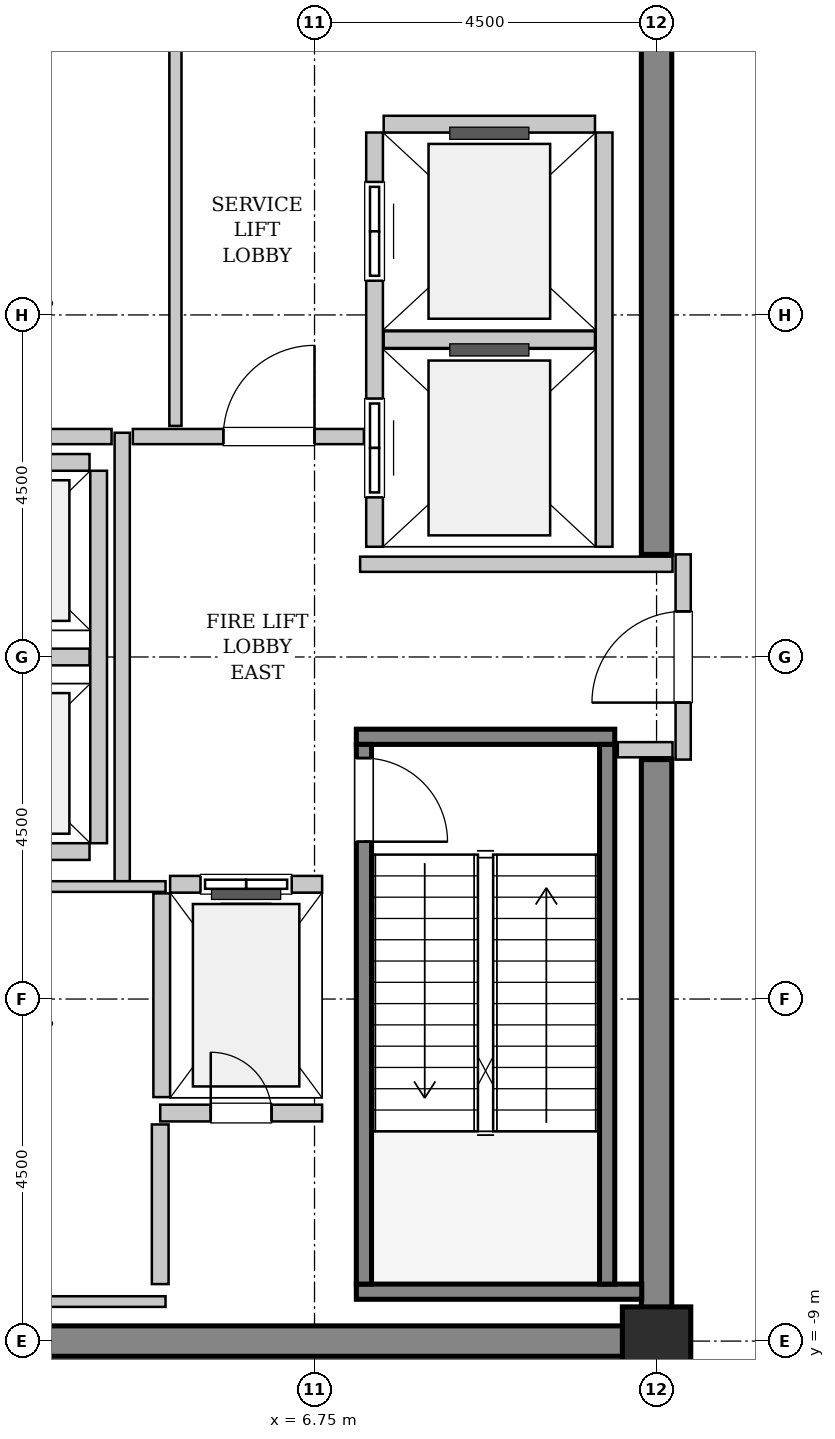
"""IFC4 building model, lengths in metres.
Left out: names, types, materials, properties, quantities, classifications, styles, units other than length and angle.
Written with IfcOpenShell. Run it as: python <this file> out.ifc"""

import sys

from ifc_helpers import new_model, si_unit, direction, frame, frame_2d, origin, origin_2d, place, context, subcontext, project, spatial, rectangle, extrude, source, transform, mapped, element, fill, save


model = new_model("IFC4")
c1 = context("Model", 3, precision=1e-05, world=origin(), true_north=direction((0.0, 1.0)))
c2 = subcontext(c1, "Body", "Model", "MODEL_VIEW")
j1 = project(units=[si_unit("LENGTHUNIT", "METRE"), si_unit("PLANEANGLEUNIT", "RADIAN")], contexts=[c1])
p1 = place(None, origin())
s1 = spatial("IfcSite", under=j1, at=p1, CompositionType="ELEMENT")
p2 = place(p1, origin())
s2 = spatial("IfcBuilding", under=s1, at=p2, CompositionType="ELEMENT")
p3 = place(p2, frame((0.0, 0.0, 353.8)))
s3 = spatial("IfcBuildingStorey", under=s2, at=p3, CompositionType="ELEMENT", Elevation=353.8)
m1 = source(origin(), c2, "Body", "SweptSolid", [
    extrude(rectangle(XDim=9.9, YDim=0.4, at=frame_2d((4.95, 0.0))), origin(), (0.0, 0.0, 1.0), 4.8),
])
p4 = place(p3, frame((1.55, -9.0, 0.0), z_axis=(0.0, 0.0, 1.0), x_axis=(1.0, 0.0, 0.0)))
e1 = element("IfcWall", 1, at=p4, inside=s3, PredefinedType="SHEAR", context=c2, shape_type="MappedRepresentation", body=[
    mapped(m1, transform((0.0, 0.0, 0.0), x_axis=(1.0, 0.0, 0.0), y_axis=(0.0, 1.0, 0.0), z_axis=(0.0, 0.0, 1.0), scale=1.0)),
])
m2 = source(origin(), c2, "Body", "SweptSolid", [
    extrude(rectangle(XDim=7.45, YDim=0.4, at=frame_2d((3.725, 0.0))), origin(), (0.0, 0.0, 1.0), 4.8),
])
for number, where, z_axis, x_axis in (
    (2, (11.25, -8.8, 0.0), (0.0, 0.0, 1.0), (0.0, 1.0, 0.0)),
    (3, (11.25, 1.35, 0.0), (0.0, 0.0, 1.0), (0.0, 1.0, 0.0)),
):
    element("IfcWall", number, at=place(p3, frame(where, z_axis=z_axis, x_axis=x_axis)), inside=s3, PredefinedType="SHEAR", context=c2, shape_type="MappedRepresentation", body=[
        mapped(m2, transform((0.0, 0.0, 0.0), x_axis=(1.0, 0.0, 0.0), y_axis=(0.0, 1.0, 0.0), z_axis=(0.0, 0.0, 1.0), scale=1.0)),
    ])
m3 = source(origin(), c2, "Body", "SweptSolid", [
    extrude(rectangle(XDim=0.9, YDim=0.9, at=origin_2d()), origin(), (0.0, 0.0, 1.0), 4.8),
])
p5 = place(p3, frame((11.25, -9.0, 0.0), z_axis=(0.0, 0.0, 1.0), x_axis=(1.0, 0.0, 0.0)))
e4 = element("IfcColumn", 4, at=p5, inside=s3, PredefinedType="COLUMN", context=c2, shape_type="MappedRepresentation", body=[
    mapped(m3, transform((0.0, 0.0, 0.0), x_axis=(1.0, 0.0, 0.0), y_axis=(0.0, 1.0, 0.0), z_axis=(0.0, 0.0, 1.0), scale=1.0)),
])
m4 = source(origin(), c2, "Body", "SweptSolid", [
    extrude(rectangle(XDim=3.4, YDim=0.2, at=frame_2d((1.7, 0.0))), origin(), (0.0, 0.0, 1.0), 4.8),
])
p6 = place(p3, frame((7.3, -1.05, 0.0), z_axis=(0.0, 0.0, 1.0), x_axis=(1.0, 0.0, 0.0)))
e5 = element("IfcWall", 5, at=p6, inside=s3, PredefinedType="SOLIDWALL", context=c2, shape_type="MappedRepresentation", body=[
    mapped(m4, transform((0.0, 0.0, 0.0), x_axis=(1.0, 0.0, 0.0), y_axis=(0.0, 1.0, 0.0), z_axis=(0.0, 0.0, 1.0), scale=1.0)),
])
m5 = source(origin(), c2, "Body", "SweptSolid", [
    extrude(rectangle(XDim=3.755, YDim=0.2, at=frame_2d((1.877, 0.0))), origin(), (0.0, 0.0, 1.0), 4.8),
])
p7 = place(p3, frame((7.3, -8.35, 0.0), z_axis=(0.0, 0.0, 1.0), x_axis=(1.0, 0.0, 0.0)))
e6 = element("IfcWall", 6, at=p7, inside=s3, PredefinedType="SOLIDWALL", context=c2, shape_type="MappedRepresentation", body=[
    mapped(m5, transform((0.0, 0.0, 0.0), x_axis=(1.0, 0.0, 0.0), y_axis=(0.0, 1.0, 0.0), z_axis=(0.0, 0.0, 1.0), scale=1.0)),
])
m6 = source(origin(), c2, "Body", "SweptSolid", [
    extrude(rectangle(XDim=7.1, YDim=0.2, at=frame_2d((3.55, 0.0))), origin(), (0.0, 0.0, 1.0), 4.8),
])
p8 = place(p3, frame((7.4, -1.15, 0.0), z_axis=(0.0, 0.0, 1.0), x_axis=(0.0, -1.0, 0.0)))
e7 = element("IfcWall", 7, at=p8, inside=s3, PredefinedType="SOLIDWALL", context=c2, shape_type="MappedRepresentation", body=[
    mapped(m6, transform((0.0, 0.0, 0.0), x_axis=(1.0, 0.0, 0.0), y_axis=(0.0, 1.0, 0.0), z_axis=(0.0, 0.0, 1.0), scale=1.0)),
])
p9 = place(p8, frame((0.18, 0.0, 0.0)))
e8 = element("IfcOpeningElement", 8, at=p9, cuts=e7, PredefinedType="OPENING", context=c2, shape_type="SweptSolid", body=[
    extrude(rectangle(XDim=1.1, YDim=2.15, at=frame_2d((0.55, 1.075))), frame((0.0, 0.11, 0.0), z_axis=(0.0, -1.0, 0.0), x_axis=(1.0, 0.0, 0.0)), (0.0, 0.0, 1.0), 0.22),
])
p10 = place(p3, frame((10.6, -1.15, 0.0), z_axis=(0.0, 0.0, 1.0), x_axis=(0.0, -1.0, 0.0)))
e9 = element("IfcWall", 9, at=p10, inside=s3, PredefinedType="SOLIDWALL", context=c2, shape_type="MappedRepresentation", body=[
    mapped(m6, transform((0.0, 0.0, 0.0), x_axis=(1.0, 0.0, 0.0), y_axis=(0.0, 1.0, 0.0), z_axis=(0.0, 0.0, 1.0), scale=1.0)),
])
m7 = source(origin(), c2, "Body", "SweptSolid", [
    extrude(rectangle(XDim=2.0, YDim=0.22, at=frame_2d((1.0, 0.0))), origin(), (0.0, 0.0, 1.0), 4.485),
])
p11 = place(p3, frame((6.85, -2.99, 0.0), z_axis=(0.0, 0.0, 1.0), x_axis=(-1.0, 0.0, 0.0)))
e10 = element("IfcWall", 10, at=p11, inside=s3, PredefinedType="SOLIDWALL", context=c2, shape_type="MappedRepresentation", body=[
    mapped(m7, transform((0.0, 0.0, 0.0), x_axis=(1.0, 0.0, 0.0), y_axis=(0.0, 1.0, 0.0), z_axis=(0.0, 0.0, 1.0), scale=1.0)),
])
p12 = place(p11, frame((0.4, 0.0, 0.0)))
e11 = element("IfcOpeningElement", 11, at=p12, cuts=e10, PredefinedType="OPENING", context=c2, shape_type="SweptSolid", body=[
    extrude(rectangle(XDim=1.2, YDim=2.2, at=frame_2d((0.6, 1.1))), frame((0.0, 0.12, 0.0), z_axis=(0.0, -1.0, 0.0), x_axis=(1.0, 0.0, 0.0)), (0.0, 0.0, 1.0), 0.24),
])
m8 = source(origin(), c2, "Body", "SweptSolid", [
    extrude(rectangle(XDim=2.68, YDim=0.22, at=frame_2d((1.34, 0.0))), origin(), (0.0, 0.0, 1.0), 4.485),
])
p13 = place(p3, frame((4.74, -3.11, 0.0), z_axis=(0.0, 0.0, 1.0), x_axis=(0.0, -1.0, 0.0)))
e12 = element("IfcWall", 12, at=p13, inside=s3, PredefinedType="SOLIDWALL", context=c2, shape_type="MappedRepresentation", body=[
    mapped(m8, transform((0.0, 0.0, 0.0), x_axis=(1.0, 0.0, 0.0), y_axis=(0.0, 1.0, 0.0), z_axis=(0.0, 0.0, 1.0), scale=1.0)),
])
m9 = source(origin(), c2, "Body", "SweptSolid", [
    extrude(rectangle(XDim=5.45, YDim=0.22, at=frame_2d((2.725, 0.0))), origin(), (0.0, 0.0, 1.0), 4.485),
])
p14 = place(p3, frame((7.54, 6.9, 0.0), z_axis=(0.0, 0.0, 1.0), x_axis=(0.0, -1.0, 0.0)))
e13 = element("IfcWall", 13, at=p14, inside=s3, PredefinedType="SOLIDWALL", context=c2, shape_type="MappedRepresentation", body=[
    mapped(m9, transform((0.0, 0.0, 0.0), x_axis=(1.0, 0.0, 0.0), y_axis=(0.0, 1.0, 0.0), z_axis=(0.0, 0.0, 1.0), scale=1.0)),
])
p15 = place(p14, frame((3.5, 0.0, 0.0)))
e14 = element("IfcOpeningElement", 14, at=p15, cuts=e13, PredefinedType="OPENING", context=c2, shape_type="SweptSolid", body=[
    extrude(rectangle(XDim=1.3, YDim=2.3, at=frame_2d((0.65, 1.15))), frame((0.0, 0.12, 0.0), z_axis=(0.0, -1.0, 0.0), x_axis=(1.0, 0.0, 0.0)), (0.0, 0.0, 1.0), 0.24),
])
p16 = place(p14, frame((0.65, 0.0, 0.0)))
e15 = element("IfcOpeningElement", 15, at=p16, cuts=e13, PredefinedType="OPENING", context=c2, shape_type="SweptSolid", body=[
    extrude(rectangle(XDim=1.3, YDim=2.3, at=frame_2d((0.65, 1.15))), frame((0.0, 0.12, 0.0), z_axis=(0.0, -1.0, 0.0), x_axis=(1.0, 0.0, 0.0)), (0.0, 0.0, 1.0), 0.24),
])
p17 = place(p3, frame((10.56, 1.45, 0.0), z_axis=(0.0, 0.0, 1.0), x_axis=(0.0, 1.0, 0.0)))
e16 = element("IfcWall", 16, at=p17, inside=s3, PredefinedType="SOLIDWALL", context=c2, shape_type="MappedRepresentation", body=[
    mapped(m9, transform((0.0, 0.0, 0.0), x_axis=(1.0, 0.0, 0.0), y_axis=(0.0, 1.0, 0.0), z_axis=(0.0, 0.0, 1.0), scale=1.0)),
])
m10 = source(origin(), c2, "Body", "SweptSolid", [
    extrude(rectangle(XDim=2.78, YDim=0.22, at=frame_2d((1.39, 0.0))), origin(), (0.0, 0.0, 1.0), 4.485),
])
for number, where, z_axis, x_axis in (
    (17, (7.66, 4.175, 0.0), (0.0, 0.0, 1.0), (1.0, 0.0, 0.0)),
    (18, (10.44, 7.01, 0.0), (0.0, 0.0, 1.0), (-1.0, 0.0, 0.0)),
):
    element("IfcWall", number, at=place(p3, frame(where, z_axis=z_axis, x_axis=x_axis)), inside=s3, PredefinedType="SOLIDWALL", context=c2, shape_type="MappedRepresentation", body=[
        mapped(m10, transform((0.0, 0.0, 0.0), x_axis=(1.0, 0.0, 0.0), y_axis=(0.0, 1.0, 0.0), z_axis=(0.0, 0.0, 1.0), scale=1.0)),
    ])
m11 = source(origin(), c2, "Body", "SweptSolid", [
    extrude(rectangle(XDim=4.9, YDim=0.22, at=frame_2d((2.45, 0.0))), origin(), (0.0, 0.0, 1.0), 4.485),
])
p18 = place(p3, frame((3.91, -2.45, 0.0), z_axis=(0.0, 0.0, 1.0), x_axis=(0.0, 1.0, 0.0)))
e19 = element("IfcWall", 19, at=p18, inside=s3, PredefinedType="SOLIDWALL", context=c2, shape_type="MappedRepresentation", body=[
    mapped(m11, transform((0.0, 0.0, 0.0), x_axis=(1.0, 0.0, 0.0), y_axis=(0.0, 1.0, 0.0), z_axis=(0.0, 0.0, 1.0), scale=1.0)),
])
m12 = source(origin(), c2, "Body", "SweptSolid", [
    extrude(rectangle(XDim=2.13, YDim=0.22, at=frame_2d((1.065, 0.0))), origin(), (0.0, 0.0, 1.0), 4.485),
])
for number, where, z_axis, x_axis in (
    (20, (1.66, -2.56, 0.0), (0.0, 0.0, 1.0), (1.0, 0.0, 0.0)),
    (21, (1.66, 0.0, 0.0), (0.0, 0.0, 1.0), (1.0, 0.0, 0.0)),
    (22, (3.79, 2.56, 0.0), (0.0, 0.0, 1.0), (-1.0, 0.0, 0.0)),
):
    element("IfcWall", number, at=place(p3, frame(where, z_axis=z_axis, x_axis=x_axis)), inside=s3, PredefinedType="SOLIDWALL", context=c2, shape_type="MappedRepresentation", body=[
        mapped(m12, transform((0.0, 0.0, 0.0), x_axis=(1.0, 0.0, 0.0), y_axis=(0.0, 1.0, 0.0), z_axis=(0.0, 0.0, 1.0), scale=1.0)),
    ])
p19 = place(p3, frame((4.72, -6.0, 0.0), z_axis=(0.0, 0.0, 1.0), x_axis=(1.0, 0.0, 0.0)))
e23 = element("IfcWall", 23, at=p19, inside=s3, PredefinedType="SOLIDWALL", context=c2, shape_type="MappedRepresentation", body=[
    mapped(m12, transform((0.0, 0.0, 0.0), x_axis=(1.0, 0.0, 0.0), y_axis=(0.0, 1.0, 0.0), z_axis=(0.0, 0.0, 1.0), scale=1.0)),
])
p20 = place(p19, frame((0.665, 0.0, 0.0)))
e24 = element("IfcOpeningElement", 24, at=p20, cuts=e23, PredefinedType="OPENING", context=c2, shape_type="SweptSolid", body=[
    extrude(rectangle(XDim=0.8, YDim=2.0, at=frame_2d((0.4, 1.0))), frame((0.0, 0.12, 0.0), z_axis=(0.0, -1.0, 0.0), x_axis=(1.0, 0.0, 0.0)), (0.0, 0.0, 1.0), 0.24),
])
m13 = source(origin(), c2, "Body", "SweptSolid", [
    extrude(rectangle(XDim=2.1, YDim=0.22, at=frame_2d((1.05, 0.0))), origin(), (0.0, 0.0, 1.0), 4.485),
])
p21 = place(p3, frame((4.72, -8.25, 0.0), z_axis=(0.0, 0.0, 1.0), x_axis=(0.0, 1.0, 0.0)))
e25 = element("IfcWall", 25, at=p21, inside=s3, PredefinedType="SOLIDWALL", context=c2, shape_type="MappedRepresentation", body=[
    mapped(m13, transform((0.0, 0.0, 0.0), x_axis=(1.0, 0.0, 0.0), y_axis=(0.0, 1.0, 0.0), z_axis=(0.0, 0.0, 1.0), scale=1.0)),
])
m14 = source(origin(), c2, "Body", "SweptSolid", [
    extrude(rectangle(XDim=2.7, YDim=0.2, at=frame_2d((1.35, 0.0))), origin(), (0.0, 0.0, 1.0), 3.575),
])
p22 = place(p3, frame((11.6, -1.35, 0.0), z_axis=(0.0, 0.0, 1.0), x_axis=(0.0, 1.0, 0.0)))
e26 = element("IfcWall", 26, at=p22, inside=s3, PredefinedType="PARTITIONING", context=c2, shape_type="MappedRepresentation", body=[
    mapped(m14, transform((0.0, 0.0, 0.0), x_axis=(1.0, 0.0, 0.0), y_axis=(0.0, 1.0, 0.0), z_axis=(0.0, 0.0, 1.0), scale=1.0)),
])
p23 = place(p22, frame((0.75, 0.0, 0.0)))
e27 = element("IfcOpeningElement", 27, at=p23, cuts=e26, PredefinedType="OPENING", context=c2, shape_type="SweptSolid", body=[
    extrude(rectangle(XDim=1.2, YDim=2.15, at=frame_2d((0.6, 1.075))), frame((0.0, 0.11, 0.0), z_axis=(0.0, -1.0, 0.0), x_axis=(1.0, 0.0, 0.0)), (0.0, 0.0, 1.0), 0.22),
])
m15 = source(origin(), c2, "Body", "SweptSolid", [
    extrude(rectangle(XDim=5.9, YDim=0.2, at=frame_2d((2.95, 0.0))), origin(), (0.0, 0.0, 1.0), 4.485),
])
p24 = place(p3, frame((4.22, -2.95, 0.0), z_axis=(0.0, 0.0, 1.0), x_axis=(0.0, 1.0, 0.0)))
e28 = element("IfcWall", 28, at=p24, inside=s3, PredefinedType="PARTITIONING", context=c2, shape_type="MappedRepresentation", body=[
    mapped(m15, transform((0.0, 0.0, 0.0), x_axis=(1.0, 0.0, 0.0), y_axis=(0.0, 1.0, 0.0), z_axis=(0.0, 0.0, 1.0), scale=1.0)),
])
m16 = source(origin(), c2, "Body", "SweptSolid", [
    extrude(rectangle(XDim=2.52, YDim=0.2, at=frame_2d((1.26, 0.0))), origin(), (0.0, 0.0, 1.0), 4.485),
])
p25 = place(p3, frame((1.56, 2.9, 0.0), z_axis=(0.0, 0.0, 1.0), x_axis=(1.0, 0.0, 0.0)))
e29 = element("IfcWall", 29, at=p25, inside=s3, PredefinedType="PARTITIONING", context=c2, shape_type="MappedRepresentation", body=[
    mapped(m16, transform((0.0, 0.0, 0.0), x_axis=(1.0, 0.0, 0.0), y_axis=(0.0, 1.0, 0.0), z_axis=(0.0, 0.0, 1.0), scale=1.0)),
])
m17 = source(origin(), c2, "Body", "SweptSolid", [
    extrude(rectangle(XDim=3.04, YDim=0.2, at=frame_2d((1.52, 0.0))), origin(), (0.0, 0.0, 1.0), 4.485),
])
p26 = place(p3, frame((4.36, 2.9, 0.0), z_axis=(0.0, 0.0, 1.0), x_axis=(1.0, 0.0, 0.0)))
e30 = element("IfcWall", 30, at=p26, inside=s3, PredefinedType="PARTITIONING", context=c2, shape_type="MappedRepresentation", body=[
    mapped(m17, transform((0.0, 0.0, 0.0), x_axis=(1.0, 0.0, 0.0), y_axis=(0.0, 1.0, 0.0), z_axis=(0.0, 0.0, 1.0), scale=1.0)),
])
p27 = place(p26, frame((1.19, 0.0, 0.0)))
e31 = element("IfcOpeningElement", 31, at=p27, cuts=e30, PredefinedType="OPENING", context=c2, shape_type="SweptSolid", body=[
    extrude(rectangle(XDim=1.2, YDim=2.15, at=frame_2d((0.6, 1.075))), frame((0.0, 0.11, 0.0), z_axis=(0.0, -1.0, 0.0), x_axis=(1.0, 0.0, 0.0)), (0.0, 0.0, 1.0), 0.22),
])
m18 = source(origin(), c2, "Body", "SweptSolid", [
    extrude(rectangle(XDim=4.11, YDim=0.2, at=frame_2d((2.055, 0.0))), origin(), (0.0, 0.0, 1.0), 4.485),
])
p28 = place(p3, frame((7.35, 1.22, 0.0), z_axis=(0.0, 0.0, 1.0), x_axis=(1.0, 0.0, 0.0)))
e32 = element("IfcWall", 32, at=p28, inside=s3, PredefinedType="PARTITIONING", context=c2, shape_type="MappedRepresentation", body=[
    mapped(m18, transform((0.0, 0.0, 0.0), x_axis=(1.0, 0.0, 0.0), y_axis=(0.0, 1.0, 0.0), z_axis=(0.0, 0.0, 1.0), scale=1.0)),
])
m19 = source(origin(), c2, "Body", "SweptSolid", [
    extrude(rectangle(XDim=0.72, YDim=0.2, at=frame_2d((0.36, 0.0))), origin(), (0.0, 0.0, 1.0), 4.485),
])
p29 = place(p3, frame((10.74, -1.22, 0.0), z_axis=(0.0, 0.0, 1.0), x_axis=(1.0, 0.0, 0.0)))
e33 = element("IfcWall", 33, at=p29, inside=s3, PredefinedType="PARTITIONING", context=c2, shape_type="MappedRepresentation", body=[
    mapped(m19, transform((0.0, 0.0, 0.0), x_axis=(1.0, 0.0, 0.0), y_axis=(0.0, 1.0, 0.0), z_axis=(0.0, 0.0, 1.0), scale=1.0)),
])
m20 = source(origin(), c2, "Body", "SweptSolid", [
    extrude(rectangle(XDim=5.45, YDim=0.16, at=frame_2d((2.725, 0.0))), origin(), (0.0, 0.0, 1.0), 4.485),
])
p30 = place(p3, frame((4.92, 3.04, 0.0), z_axis=(0.0, 0.0, 1.0), x_axis=(0.0, 1.0, 0.0)))
e34 = element("IfcWall", 34, at=p30, inside=s3, PredefinedType="PARTITIONING", context=c2, shape_type="MappedRepresentation", body=[
    mapped(m20, transform((0.0, 0.0, 0.0), x_axis=(1.0, 0.0, 0.0), y_axis=(0.0, 1.0, 0.0), z_axis=(0.0, 0.0, 1.0), scale=1.0)),
])
m21 = source(origin(), c2, "Body", "SweptSolid", [
    extrude(rectangle(XDim=3.15, YDim=0.14, at=frame_2d((1.575, 0.0))), origin(), (0.0, 0.0, 1.0), 4.485),
])
for number, where, z_axis, x_axis in (
    (35, (1.64, -3.02, 0.0), (0.0, 0.0, 1.0), (1.0, 0.0, 0.0)),
    (36, (1.64, -8.48, 0.0), (0.0, 0.0, 1.0), (1.0, 0.0, 0.0)),
):
    element("IfcWall", number, at=place(p3, frame(where, z_axis=z_axis, x_axis=x_axis)), inside=s3, PredefinedType="PARTITIONING", context=c2, shape_type="MappedRepresentation", body=[
        mapped(m21, transform((0.0, 0.0, 0.0), x_axis=(1.0, 0.0, 0.0), y_axis=(0.0, 1.0, 0.0), z_axis=(0.0, 0.0, 1.0), scale=1.0)),
    ])
m22 = source(origin(), c2, "Body", "SweptSolid", [
    extrude(rectangle(XDim=1.1, YDim=2.15, at=frame_2d((0.55, 1.075))), frame((0.0, 0.025, 0.0), z_axis=(0.0, -1.0, 0.0), x_axis=(1.0, 0.0, 0.0)), (0.0, 0.0, 1.0), 0.05),
])
p31 = place(p9, origin())
e37 = element("IfcDoor", 37, at=p31, inside=s3, OperationType="SINGLE_SWING_RIGHT", PredefinedType="DOOR", context=c2, shape_type="MappedRepresentation", body=[
    mapped(m22, transform((0.0, 0.0, 0.0), x_axis=(1.0, 0.0, 0.0), y_axis=(0.0, 1.0, 0.0), z_axis=(0.0, 0.0, 1.0), scale=1.0)),
])
fill(e8, e37)
m23 = source(origin(), c2, "Body", "SweptSolid", [
    extrude(rectangle(XDim=1.2, YDim=2.2, at=frame_2d((0.6, 1.1))), frame((0.0, 0.025, 0.0), z_axis=(0.0, -1.0, 0.0), x_axis=(1.0, 0.0, 0.0)), (0.0, 0.0, 1.0), 0.05),
])
p32 = place(p12, origin())
e38 = element("IfcDoor", 38, at=p32, inside=s3, OperationType="SLIDING_TO_LEFT", PredefinedType="DOOR", context=c2, shape_type="MappedRepresentation", body=[
    mapped(m23, transform((0.0, 0.0, 0.0), x_axis=(1.0, 0.0, 0.0), y_axis=(0.0, 1.0, 0.0), z_axis=(0.0, 0.0, 1.0), scale=1.0)),
])
fill(e11, e38)
m24 = source(origin(), c2, "Body", "SweptSolid", [
    extrude(rectangle(XDim=1.3, YDim=2.3, at=frame_2d((0.65, 1.15))), frame((0.0, 0.025, 0.0), z_axis=(0.0, -1.0, 0.0), x_axis=(1.0, 0.0, 0.0)), (0.0, 0.0, 1.0), 0.05),
])
p33 = place(p15, origin())
e39 = element("IfcDoor", 39, at=p33, inside=s3, OperationType="SLIDING_TO_RIGHT", PredefinedType="DOOR", context=c2, shape_type="MappedRepresentation", body=[
    mapped(m24, transform((0.0, 0.0, 0.0), x_axis=(1.0, 0.0, 0.0), y_axis=(0.0, 1.0, 0.0), z_axis=(0.0, 0.0, 1.0), scale=1.0)),
])
fill(e14, e39)
p34 = place(p16, origin())
e40 = element("IfcDoor", 40, at=p34, inside=s3, OperationType="SLIDING_TO_RIGHT", PredefinedType="DOOR", context=c2, shape_type="MappedRepresentation", body=[
    mapped(m24, transform((0.0, 0.0, 0.0), x_axis=(1.0, 0.0, 0.0), y_axis=(0.0, 1.0, 0.0), z_axis=(0.0, 0.0, 1.0), scale=1.0)),
])
fill(e15, e40)
m25 = source(origin(), c2, "Body", "SweptSolid", [
    extrude(rectangle(XDim=0.8, YDim=2.0, at=frame_2d((0.4, 1.0))), frame((0.0, 0.025, 0.0), z_axis=(0.0, -1.0, 0.0), x_axis=(1.0, 0.0, 0.0)), (0.0, 0.0, 1.0), 0.05),
])
p35 = place(p20, origin())
e41 = element("IfcDoor", 41, at=p35, inside=s3, OperationType="SINGLE_SWING_LEFT", PredefinedType="TRAPDOOR", context=c2, shape_type="MappedRepresentation", body=[
    mapped(m25, transform((0.0, 0.0, 0.0), x_axis=(1.0, 0.0, 0.0), y_axis=(0.0, 1.0, 0.0), z_axis=(0.0, 0.0, 1.0), scale=1.0)),
])
fill(e24, e41)
m26 = source(origin(), c2, "Body", "SweptSolid", [
    extrude(rectangle(XDim=1.2, YDim=2.15, at=frame_2d((0.6, 1.075))), frame((0.0, 0.025, 0.0), z_axis=(0.0, -1.0, 0.0), x_axis=(1.0, 0.0, 0.0)), (0.0, 0.0, 1.0), 0.05),
])
p36 = place(p23, origin())
e42 = element("IfcDoor", 42, at=p36, inside=s3, OperationType="SINGLE_SWING_LEFT", PredefinedType="DOOR", context=c2, shape_type="MappedRepresentation", body=[
    mapped(m26, transform((0.0, 0.0, 0.0), x_axis=(1.0, 0.0, 0.0), y_axis=(0.0, 1.0, 0.0), z_axis=(0.0, 0.0, 1.0), scale=1.0)),
])
fill(e27, e42)
p37 = place(p27, origin())
e43 = element("IfcDoor", 43, at=p37, inside=s3, OperationType="SINGLE_SWING_RIGHT", PredefinedType="DOOR", context=c2, shape_type="MappedRepresentation", body=[
    mapped(m26, transform((0.0, 0.0, 0.0), x_axis=(1.0, 0.0, 0.0), y_axis=(0.0, 1.0, 0.0), z_axis=(0.0, 0.0, 1.0), scale=1.0)),
])
fill(e31, e43)
save(model, sys.argv[1])
